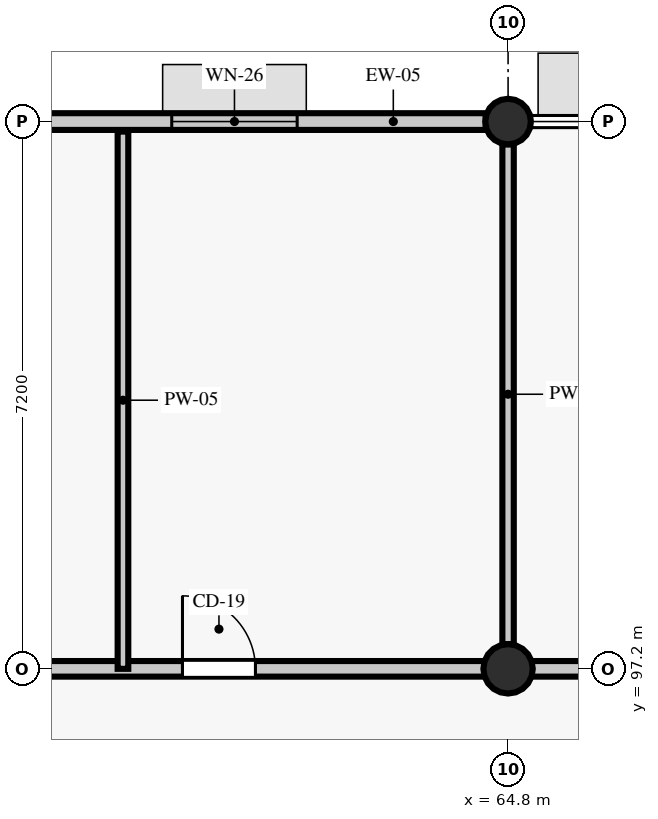
"""IFC4 building model, lengths in metres.
Left out: names, types, materials, properties, quantities, classifications, styles, units other than length and angle.
Written with IfcOpenShell. Run it as: python <this file> out.ifc"""

import sys

from ifc_helpers import new_model, si_unit, direction, frame, frame_2d, origin, origin_2d, place, context, subcontext, project, spatial, rectangle, circle, extrude, element, fill, save


model = new_model("IFC4")
c1 = context("Model", 3, precision=1e-05, world=origin(), true_north=direction((0.0, 1.0)))
c2 = subcontext(c1, "Body", "Model", "MODEL_VIEW")
j1 = project(units=[si_unit("LENGTHUNIT", "METRE"), si_unit("PLANEANGLEUNIT", "RADIAN")], contexts=[c1])
p1 = place(None, origin())
s1 = spatial("IfcSite", under=j1, at=p1, CompositionType="ELEMENT")
p2 = place(p1, origin())
s2 = spatial("IfcBuilding", under=s1, at=p2, CompositionType="ELEMENT")
p3 = place(p2, frame((0.0, 0.0, 9.6)))
s3 = spatial("IfcBuildingStorey", under=s2, at=p3, CompositionType="ELEMENT", Elevation=9.6)
p4 = place(p3, frame((64.8, 97.2, 0.0), z_axis=(0.0, 0.0, 1.0), x_axis=(1.0, 0.0, 0.0)))
e1 = element("IfcColumn", 1, at=p4, inside=s3, PredefinedType="COLUMN", context=c2, shape_type="SweptSolid", body=[
    extrude(circle(Radius=0.325, at=origin_2d()), origin(), (0.0, 0.0, 1.0), 3.95),
])
p5 = place(p3, frame((64.8, 104.4, 0.0), z_axis=(0.0, 0.0, 1.0), x_axis=(1.0, 0.0, 0.0)))
e2 = element("IfcColumn", 2, at=p5, inside=s3, PredefinedType="COLUMN", context=c2, shape_type="SweptSolid", body=[
    extrude(circle(Radius=0.3, at=origin_2d()), origin(), (0.0, 0.0, 1.0), 3.95),
])
p6 = place(p3, frame((64.505, 104.4, 0.0), z_axis=(0.0, 0.0, 1.0), x_axis=(-1.0, 0.0, 0.0)))
e3 = element("IfcWall", 3, at=p6, inside=s3, PredefinedType="STANDARD", context=c2, shape_type="SweptSolid", body=[
    extrude(rectangle(XDim=6.61, YDim=0.22, at=frame_2d((3.305, 0.0))), origin(), (0.0, 0.0, 1.0), 3.3),
])
p7 = place(p6, frame((2.48, 0.0, 0.9)))
e4 = element("IfcOpeningElement", 4, at=p7, cuts=e3, PredefinedType="OPENING", context=c2, shape_type="SweptSolid", body=[
    extrude(rectangle(XDim=1.65, YDim=1.54, at=frame_2d((0.825, 0.77))), frame((0.0, 0.12, 0.0), z_axis=(0.0, -1.0, 0.0), x_axis=(1.0, 0.0, 0.0)), (0.0, 0.0, 1.0), 0.24),
])
p8 = place(p3, frame((50.7, 97.2, 0.0), z_axis=(0.0, 0.0, 1.0), x_axis=(1.0, 0.0, 0.0)))
e5 = element("IfcWall", 5, at=p8, inside=s3, PredefinedType="PARTITIONING", context=c2, shape_type="SweptSolid", body=[
    extrude(rectangle(XDim=35.4, YDim=0.205, at=frame_2d((17.7, 0.0))), origin(), (0.0, 0.0, 1.0), 3.2),
])
p9 = place(p8, frame((2.873, 0.0, 0.0)))
e6 = element("IfcOpeningElement", 6, at=p9, cuts=e5, PredefinedType="OPENING", context=c2, shape_type="SweptSolid", body=[
    extrude(rectangle(XDim=1.18, YDim=2.18, at=frame_2d((0.59, 1.09))), frame((0.0, 0.113, 0.0), z_axis=(0.0, -1.0, 0.0), x_axis=(1.0, 0.0, 0.0)), (0.0, 0.0, 1.0), 0.225),
])
p10 = place(p8, frame((9.816, 0.0, 0.0)))
e7 = element("IfcOpeningElement", 7, at=p10, cuts=e5, PredefinedType="OPENING", context=c2, shape_type="SweptSolid", body=[
    extrude(rectangle(XDim=0.96, YDim=2.23, at=frame_2d((0.48, 1.115))), frame((0.0, 0.113, 0.0), z_axis=(0.0, -1.0, 0.0), x_axis=(1.0, 0.0, 0.0)), (0.0, 0.0, 1.0), 0.225),
])
p11 = place(p8, frame((15.09, 0.0, 0.0)))
e8 = element("IfcOpeningElement", 8, at=p11, cuts=e5, PredefinedType="OPENING", context=c2, shape_type="SweptSolid", body=[
    extrude(rectangle(XDim=0.9, YDim=2.13, at=frame_2d((0.45, 1.065))), frame((0.0, 0.113, 0.0), z_axis=(0.0, -1.0, 0.0), x_axis=(1.0, 0.0, 0.0)), (0.0, 0.0, 1.0), 0.225),
])
p12 = place(p8, frame((17.25, 0.0, 0.0)))
e9 = element("IfcOpeningElement", 9, at=p12, cuts=e5, PredefinedType="OPENING", context=c2, shape_type="SweptSolid", body=[
    extrude(rectangle(XDim=0.92, YDim=2.18, at=frame_2d((0.46, 1.09))), frame((0.0, 0.113, 0.0), z_axis=(0.0, -1.0, 0.0), x_axis=(1.0, 0.0, 0.0)), (0.0, 0.0, 1.0), 0.225),
])
p13 = place(p8, frame((19.47, 0.0, 0.0)))
e10 = element("IfcOpeningElement", 10, at=p13, cuts=e5, PredefinedType="OPENING", context=c2, shape_type="SweptSolid", body=[
    extrude(rectangle(XDim=0.94, YDim=2.08, at=frame_2d((0.47, 1.04))), frame((0.0, 0.113, 0.0), z_axis=(0.0, -1.0, 0.0), x_axis=(1.0, 0.0, 0.0)), (0.0, 0.0, 1.0), 0.225),
])
p14 = place(p8, frame((23.987, 0.0, 0.0)))
e11 = element("IfcOpeningElement", 11, at=p14, cuts=e5, PredefinedType="OPENING", context=c2, shape_type="SweptSolid", body=[
    extrude(rectangle(XDim=0.9, YDim=2.08, at=frame_2d((0.45, 1.04))), frame((0.0, 0.113, 0.0), z_axis=(0.0, -1.0, 0.0), x_axis=(1.0, 0.0, 0.0)), (0.0, 0.0, 1.0), 0.225),
])
p15 = place(p8, frame((25.647, 0.0, 0.0)))
e12 = element("IfcOpeningElement", 12, at=p15, cuts=e5, PredefinedType="OPENING", context=c2, shape_type="SweptSolid", body=[
    extrude(rectangle(XDim=0.94, YDim=2.08, at=frame_2d((0.47, 1.04))), frame((0.0, 0.113, 0.0), z_axis=(0.0, -1.0, 0.0), x_axis=(1.0, 0.0, 0.0)), (0.0, 0.0, 1.0), 0.225),
])
p16 = place(p8, frame((31.749, 0.0, 0.0)))
e13 = element("IfcOpeningElement", 13, at=p16, cuts=e5, PredefinedType="OPENING", context=c2, shape_type="SweptSolid", body=[
    extrude(rectangle(XDim=0.98, YDim=2.08, at=frame_2d((0.49, 1.04))), frame((0.0, 0.113, 0.0), z_axis=(0.0, -1.0, 0.0), x_axis=(1.0, 0.0, 0.0)), (0.0, 0.0, 1.0), 0.225),
])
p17 = place(p3, frame((59.733, 97.2, 0.0), z_axis=(0.0, 0.0, 1.0), x_axis=(0.0, 1.0, 0.0)))
e14 = element("IfcWall", 14, at=p17, inside=s3, PredefinedType="PARTITIONING", context=c2, shape_type="SweptSolid", body=[
    extrude(rectangle(XDim=7.068, YDim=0.14, at=frame_2d((3.534, 0.0))), origin(), (0.0, 0.0, 1.0), 3.2),
])
p18 = place(p3, frame((64.8, 97.525, 0.0), z_axis=(0.0, 0.0, 1.0), x_axis=(0.0, 1.0, 0.0)))
e15 = element("IfcWall", 15, at=p18, inside=s3, PredefinedType="PARTITIONING", context=c2, shape_type="SweptSolid", body=[
    extrude(rectangle(XDim=6.575, YDim=0.15, at=frame_2d((3.288, 0.0))), origin(), (0.0, 0.0, 1.0), 3.4),
])
p19 = place(p7, origin())
e16 = element("IfcWindow", 16, at=p19, inside=s3, PartitioningType="SINGLE_PANEL", PredefinedType="WINDOW", context=c2, shape_type="SweptSolid", body=[
    extrude(rectangle(XDim=1.65, YDim=1.54, at=frame_2d((0.825, 0.77))), frame((0.0, 0.03, 0.0), z_axis=(0.0, -1.0, 0.0), x_axis=(1.0, 0.0, 0.0)), (0.0, 0.0, 1.0), 0.06),
])
fill(e4, e16)
p20 = place(p10, origin())
e17 = element("IfcDoor", 17, at=p20, inside=s3, OperationType="SINGLE_SWING_LEFT", PredefinedType="DOOR", context=c2, shape_type="SweptSolid", body=[
    extrude(rectangle(XDim=0.96, YDim=2.23, at=frame_2d((0.48, 1.115))), frame((0.0, 0.025, 0.0), z_axis=(0.0, -1.0, 0.0), x_axis=(1.0, 0.0, 0.0)), (0.0, 0.0, 1.0), 0.05),
])
fill(e7, e17)
save(model, sys.argv[1])
